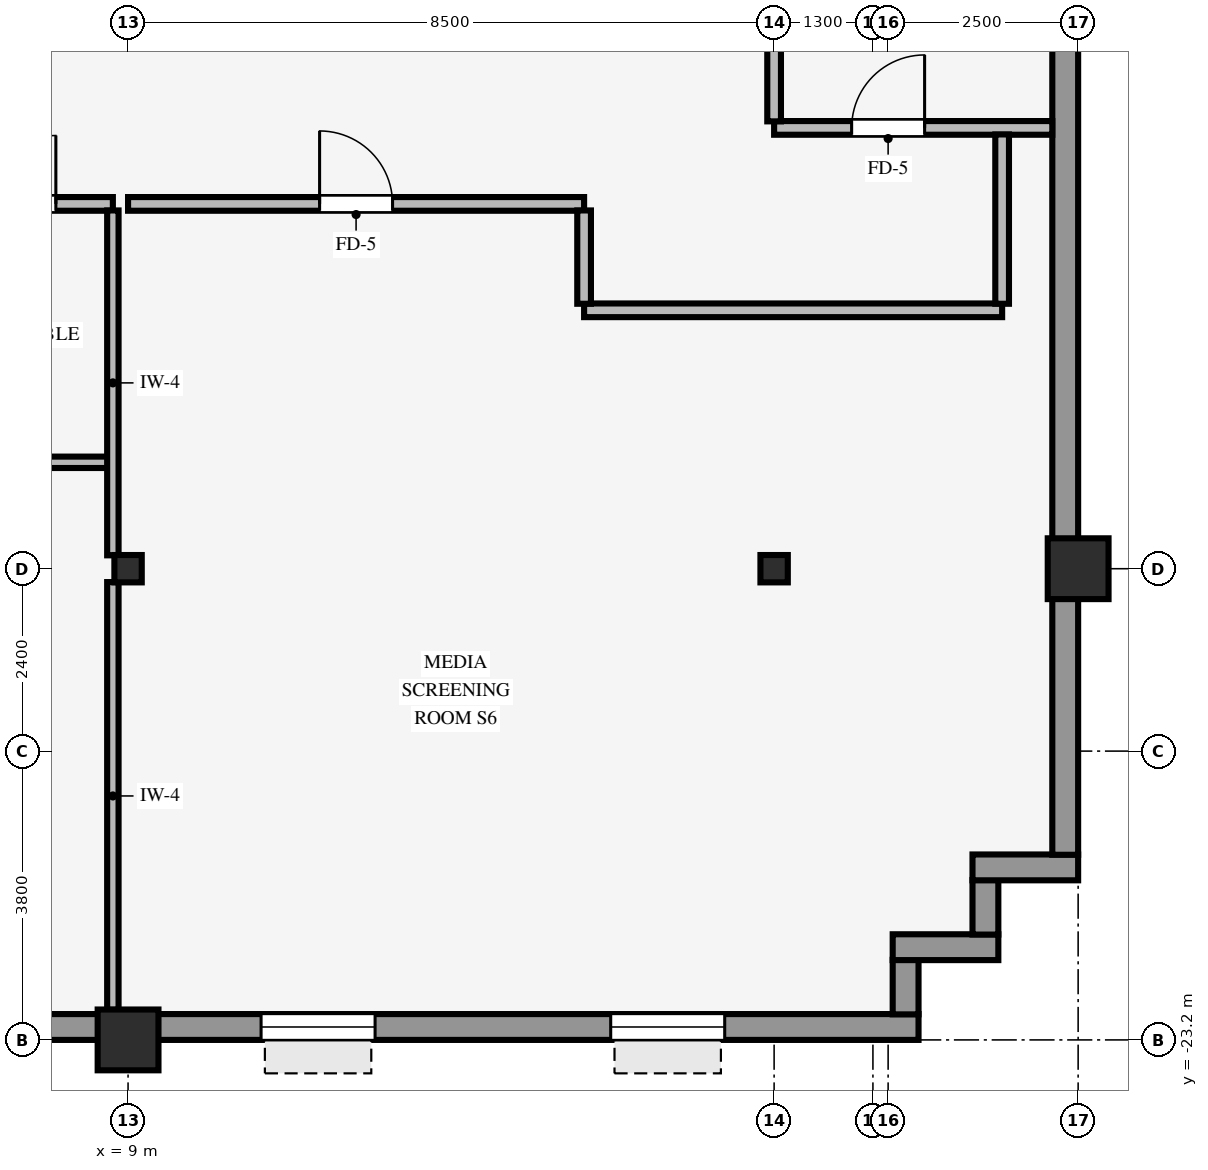
"""IFC4 building model, lengths in metres.
Left out: names, types, materials, properties, quantities, classifications, styles, units other than length and angle.
Written with IfcOpenShell. Run it as: python <this file> out.ifc"""

import sys

from ifc_helpers import new_model, si_unit, direction, frame, frame_2d, origin, origin_2d, place, context, subcontext, project, spatial, rectangle, hollow_rectangle, i_section, extrude, source, transform, mapped, element, fill, save


model = new_model("IFC4")
c1 = context("Model", 3, precision=1e-05, world=origin(), true_north=direction((0.0, 1.0)))
c2 = subcontext(c1, "Body", "Model", "MODEL_VIEW")
j1 = project(units=[si_unit("LENGTHUNIT", "METRE"), si_unit("PLANEANGLEUNIT", "RADIAN")], contexts=[c1])
p1 = place(None, origin())
s1 = spatial("IfcSite", under=j1, at=p1, CompositionType="ELEMENT")
p2 = place(p1, origin())
s2 = spatial("IfcBuilding", under=s1, at=p2, CompositionType="ELEMENT")
p3 = place(p2, frame((0.0, 0.0, 67.75)))
s3 = spatial("IfcBuildingStorey", under=s2, at=p3, CompositionType="ELEMENT", Elevation=67.75)
for number, where, z_axis, x_axis in (
    (1, (21.5, -17.0, 0.0), (0.0, 0.0, 1.0), (1.0, 0.0, 0.0)),
    (2, (9.0, -23.2, 0.0), (0.0, 0.0, 1.0), (1.0, 0.0, 0.0)),
):
    element("IfcColumn", number, at=place(p3, frame(where, z_axis=z_axis, x_axis=x_axis)), inside=s3, PredefinedType="COLUMN", context=c2, shape_type="SweptSolid", body=[
        extrude(hollow_rectangle(XDim=0.8, YDim=0.8, WallThickness=0.055, InnerFilletRadius=0.055, OuterFilletRadius=0.11, at=origin_2d()), origin(), (0.0, 0.0, 1.0), 3.37),
    ])
for number, where, z_axis, x_axis in (
    (3, (9.0, -17.0, 0.0), (0.0, 0.0, 1.0), (1.0, 0.0, 0.0)),
    (4, (17.5, -17.0, 0.0), (0.0, 0.0, 1.0), (1.0, 0.0, 0.0)),
):
    element("IfcColumn", number, at=place(p3, frame(where, z_axis=z_axis, x_axis=x_axis)), inside=s3, PredefinedType="COLUMN", context=c2, shape_type="SweptSolid", body=[
        extrude(i_section(OverallWidth=0.36, OverallDepth=0.36, WebThickness=0.021, FlangeThickness=0.021, FilletRadius=0.018, at=origin_2d()), origin(), (0.0, 0.0, 1.0), 3.37),
    ])
p4 = place(p3, frame((-19.4, -23.03, 0.0), z_axis=(0.0, 0.0, 1.0), x_axis=(1.0, 0.0, 0.0)))
e5 = element("IfcWall", 5, at=p4, inside=s3, PredefinedType="STANDARD", context=c2, shape_type="SweptSolid", body=[
    extrude(rectangle(XDim=38.8, YDim=0.34, at=frame_2d((19.4, 0.0))), origin(), (0.0, 0.0, 1.0), 2.705),
])
p5 = place(p4, frame((2.55, 0.0, 0.8)))
e6 = element("IfcOpeningElement", 6, at=p5, cuts=e5, PredefinedType="OPENING", context=c2, shape_type="SweptSolid", body=[
    extrude(rectangle(XDim=1.5, YDim=1.6, at=frame_2d((0.75, 0.8))), frame((0.0, 0.18, 0.0), z_axis=(0.0, -1.0, 0.0), x_axis=(1.0, 0.0, 0.0)), (0.0, 0.0, 1.0), 0.36),
])
p6 = place(p4, frame((6.25, 0.0, 0.8)))
e7 = element("IfcOpeningElement", 7, at=p6, cuts=e5, PredefinedType="OPENING", context=c2, shape_type="SweptSolid", body=[
    extrude(rectangle(XDim=1.5, YDim=1.6, at=frame_2d((0.75, 0.8))), frame((0.0, 0.18, 0.0), z_axis=(0.0, -1.0, 0.0), x_axis=(1.0, 0.0, 0.0)), (0.0, 0.0, 1.0), 0.36),
])
p7 = place(p4, frame((12.65, 0.0, 0.8)))
e8 = element("IfcOpeningElement", 8, at=p7, cuts=e5, PredefinedType="OPENING", context=c2, shape_type="SweptSolid", body=[
    extrude(rectangle(XDim=1.5, YDim=1.6, at=frame_2d((0.75, 0.8))), frame((0.0, 0.18, 0.0), z_axis=(0.0, -1.0, 0.0), x_axis=(1.0, 0.0, 0.0)), (0.0, 0.0, 1.0), 0.36),
])
p8 = place(p4, frame((16.35, 0.0, 0.8)))
e9 = element("IfcOpeningElement", 9, at=p8, cuts=e5, PredefinedType="OPENING", context=c2, shape_type="SweptSolid", body=[
    extrude(rectangle(XDim=1.5, YDim=1.6, at=frame_2d((0.75, 0.8))), frame((0.0, 0.18, 0.0), z_axis=(0.0, -1.0, 0.0), x_axis=(1.0, 0.0, 0.0)), (0.0, 0.0, 1.0), 0.36),
])
p9 = place(p4, frame((20.95, 0.0, 0.8)))
e10 = element("IfcOpeningElement", 10, at=p9, cuts=e5, PredefinedType="OPENING", context=c2, shape_type="SweptSolid", body=[
    extrude(rectangle(XDim=1.5, YDim=1.6, at=frame_2d((0.75, 0.8))), frame((0.0, 0.18, 0.0), z_axis=(0.0, -1.0, 0.0), x_axis=(1.0, 0.0, 0.0)), (0.0, 0.0, 1.0), 0.36),
])
p10 = place(p4, frame((25.55, 0.0, 0.8)))
e11 = element("IfcOpeningElement", 11, at=p10, cuts=e5, PredefinedType="OPENING", context=c2, shape_type="SweptSolid", body=[
    extrude(rectangle(XDim=1.5, YDim=1.6, at=frame_2d((0.75, 0.8))), frame((0.0, 0.18, 0.0), z_axis=(0.0, -1.0, 0.0), x_axis=(1.0, 0.0, 0.0)), (0.0, 0.0, 1.0), 0.36),
])
p11 = place(p4, frame((30.15, 0.0, 0.8)))
e12 = element("IfcOpeningElement", 12, at=p11, cuts=e5, PredefinedType="OPENING", context=c2, shape_type="SweptSolid", body=[
    extrude(rectangle(XDim=1.5, YDim=1.6, at=frame_2d((0.75, 0.8))), frame((0.0, 0.18, 0.0), z_axis=(0.0, -1.0, 0.0), x_axis=(1.0, 0.0, 0.0)), (0.0, 0.0, 1.0), 0.36),
])
p12 = place(p4, frame((34.75, 0.0, 0.8)))
e13 = element("IfcOpeningElement", 13, at=p12, cuts=e5, PredefinedType="OPENING", context=c2, shape_type="SweptSolid", body=[
    extrude(rectangle(XDim=1.5, YDim=1.6, at=frame_2d((0.75, 0.8))), frame((0.0, 0.18, 0.0), z_axis=(0.0, -1.0, 0.0), x_axis=(1.0, 0.0, 0.0)), (0.0, 0.0, 1.0), 0.36),
])
p13 = place(p3, frame((19.23, -22.864, 0.0), z_axis=(0.0, 0.0, 1.0), x_axis=(0.0, 1.0, 0.0)))
e14 = element("IfcWall", 14, at=p13, inside=s3, PredefinedType="STANDARD", context=c2, shape_type="SweptSolid", body=[
    extrude(rectangle(XDim=0.718, YDim=0.34, at=frame_2d((0.359, 0.0))), origin(), (0.0, 0.0, 1.0), 3.36),
])
p14 = place(p3, frame((19.06, -21.98, 0.0), z_axis=(0.0, 0.0, 1.0), x_axis=(1.0, 0.0, 0.0)))
e15 = element("IfcWall", 15, at=p14, inside=s3, PredefinedType="STANDARD", context=c2, shape_type="SweptSolid", body=[
    extrude(rectangle(XDim=1.39, YDim=0.34, at=frame_2d((0.695, 0.0))), origin(), (0.0, 0.0, 1.0), 3.36),
])
p15 = place(p3, frame((20.28, -21.814, 0.0), z_axis=(0.0, 0.0, 1.0), x_axis=(0.0, 1.0, 0.0)))
e16 = element("IfcWall", 16, at=p15, inside=s3, PredefinedType="STANDARD", context=c2, shape_type="SweptSolid", body=[
    extrude(rectangle(XDim=0.718, YDim=0.34, at=frame_2d((0.359, 0.0))), origin(), (0.0, 0.0, 1.0), 3.36),
])
p16 = place(p3, frame((20.11, -20.93, 0.0), z_axis=(0.0, 0.0, 1.0), x_axis=(1.0, 0.0, 0.0)))
e17 = element("IfcWall", 17, at=p16, inside=s3, PredefinedType="STANDARD", context=c2, shape_type="SweptSolid", body=[
    extrude(rectangle(XDim=1.39, YDim=0.34, at=frame_2d((0.695, 0.0))), origin(), (0.0, 0.0, 1.0), 3.36),
])
p17 = place(p3, frame((21.33, -20.764, 0.0), z_axis=(0.0, 0.0, 1.0), x_axis=(0.0, 1.0, 0.0)))
e18 = element("IfcWall", 18, at=p17, inside=s3, PredefinedType="STANDARD", context=c2, shape_type="SweptSolid", body=[
    extrude(rectangle(XDim=41.528, YDim=0.34, at=frame_2d((20.764, 0.0))), origin(), (0.0, 0.0, 1.0), 2.705),
])
p18 = place(p17, frame((12.202, 0.0, 0.8)))
e19 = element("IfcOpeningElement", 19, at=p18, cuts=e18, PredefinedType="OPENING", context=c2, shape_type="SweptSolid", body=[
    extrude(rectangle(XDim=2.3, YDim=1.62, at=frame_2d((1.15, 0.81))), frame((0.0, 0.18, 0.0), z_axis=(0.0, -1.0, 0.0), x_axis=(1.0, 0.0, 0.0)), (0.0, 0.0, 1.0), 0.36),
])
p19 = place(p17, frame((17.144, 0.0, 0.8)))
e20 = element("IfcOpeningElement", 20, at=p19, cuts=e18, PredefinedType="OPENING", context=c2, shape_type="SweptSolid", body=[
    extrude(rectangle(XDim=2.3, YDim=1.62, at=frame_2d((1.15, 0.81))), frame((0.0, 0.18, 0.0), z_axis=(0.0, -1.0, 0.0), x_axis=(1.0, 0.0, 0.0)), (0.0, 0.0, 1.0), 0.36),
])
p20 = place(p17, frame((22.084, 0.0, 0.8)))
e21 = element("IfcOpeningElement", 21, at=p20, cuts=e18, PredefinedType="OPENING", context=c2, shape_type="SweptSolid", body=[
    extrude(rectangle(XDim=2.3, YDim=1.62, at=frame_2d((1.15, 0.81))), frame((0.0, 0.18, 0.0), z_axis=(0.0, -1.0, 0.0), x_axis=(1.0, 0.0, 0.0)), (0.0, 0.0, 1.0), 0.36),
])
p21 = place(p17, frame((27.025, 0.0, 0.8)))
e22 = element("IfcOpeningElement", 22, at=p21, cuts=e18, PredefinedType="OPENING", context=c2, shape_type="SweptSolid", body=[
    extrude(rectangle(XDim=2.3, YDim=1.62, at=frame_2d((1.15, 0.81))), frame((0.0, 0.18, 0.0), z_axis=(0.0, -1.0, 0.0), x_axis=(1.0, 0.0, 0.0)), (0.0, 0.0, 1.0), 0.36),
])
p22 = place(p3, frame((1.2, -15.6, 0.0), z_axis=(0.0, 0.0, 1.0), x_axis=(1.0, 0.0, 0.0)))
e23 = element("IfcWall", 23, at=p22, inside=s3, PredefinedType="PARTITIONING", context=c2, shape_type="SweptSolid", body=[
    extrude(rectangle(XDim=7.539, YDim=0.15, at=frame_2d((3.77, 0.0))), origin(), (0.0, 0.0, 1.0), 3.36),
])
p23 = place(p3, frame((15.0, -13.6, 0.0), z_axis=(0.0, 0.0, 1.0), x_axis=(1.0, 0.0, 0.0)))
e24 = element("IfcWall", 24, at=p23, inside=s3, PredefinedType="PARTITIONING", context=c2, shape_type="SweptSolid", body=[
    extrude(rectangle(XDim=5.5, YDim=0.18, at=frame_2d((2.75, 0.0))), origin(), (0.0, 0.0, 1.0), 2.942),
])
p24 = place(p3, frame((-15.0, -12.2, 0.0), z_axis=(0.0, 0.0, 1.0), x_axis=(1.0, 0.0, 0.0)))
e25 = element("IfcWall", 25, at=p24, inside=s3, PredefinedType="PARTITIONING", context=c2, shape_type="SweptSolid", body=[
    extrude(rectangle(XDim=23.8, YDim=0.18, at=frame_2d((11.9, 0.0))), origin(), (0.0, 0.0, 1.0), 3.36),
])
p25 = place(p24, frame((9.31, 0.0, 0.0)))
e26 = element("IfcOpeningElement", 26, at=p25, cuts=e25, PredefinedType="OPENING", context=c2, shape_type="SweptSolid", body=[
    extrude(rectangle(XDim=0.96, YDim=2.1, at=frame_2d((0.48, 1.05))), frame((0.0, 0.1, 0.0), z_axis=(0.0, -1.0, 0.0), x_axis=(1.0, 0.0, 0.0)), (0.0, 0.0, 1.0), 0.2),
])
p26 = place(p24, frame((1.715, 0.0, 0.0)))
e27 = element("IfcOpeningElement", 27, at=p26, cuts=e25, PredefinedType="OPENING", context=c2, shape_type="SweptSolid", body=[
    extrude(rectangle(XDim=0.96, YDim=2.1, at=frame_2d((0.48, 1.05))), frame((0.0, 0.1, 0.0), z_axis=(0.0, -1.0, 0.0), x_axis=(1.0, 0.0, 0.0)), (0.0, 0.0, 1.0), 0.2),
])
p27 = place(p24, frame((5.44, 0.0, 0.0)))
e28 = element("IfcOpeningElement", 28, at=p27, cuts=e25, PredefinedType="OPENING", context=c2, shape_type="SweptSolid", body=[
    extrude(rectangle(XDim=0.96, YDim=2.1, at=frame_2d((0.48, 1.05))), frame((0.0, 0.1, 0.0), z_axis=(0.0, -1.0, 0.0), x_axis=(1.0, 0.0, 0.0)), (0.0, 0.0, 1.0), 0.2),
])
p28 = place(p24, frame((19.65, 0.0, 0.0)))
e29 = element("IfcOpeningElement", 29, at=p28, cuts=e25, PredefinedType="OPENING", context=c2, shape_type="SweptSolid", body=[
    extrude(rectangle(XDim=0.9, YDim=2.1, at=frame_2d((0.45, 1.05))), frame((0.0, 0.1, 0.0), z_axis=(0.0, -1.0, 0.0), x_axis=(1.0, 0.0, 0.0)), (0.0, 0.0, 1.0), 0.2),
])
p29 = place(p24, frame((17.05, 0.0, 0.0)))
e30 = element("IfcOpeningElement", 30, at=p29, cuts=e25, PredefinedType="OPENING", context=c2, shape_type="SweptSolid", body=[
    extrude(rectangle(XDim=0.9, YDim=2.1, at=frame_2d((0.45, 1.05))), frame((0.0, 0.1, 0.0), z_axis=(0.0, -1.0, 0.0), x_axis=(1.0, 0.0, 0.0)), (0.0, 0.0, 1.0), 0.2),
])
p30 = place(p24, frame((22.15, 0.0, 0.0)))
e31 = element("IfcOpeningElement", 31, at=p30, cuts=e25, PredefinedType="OPENING", context=c2, shape_type="SweptSolid", body=[
    extrude(rectangle(XDim=0.9, YDim=2.1, at=frame_2d((0.45, 1.05))), frame((0.0, 0.1, 0.0), z_axis=(0.0, -1.0, 0.0), x_axis=(1.0, 0.0, 0.0)), (0.0, 0.0, 1.0), 0.2),
])
p31 = place(p24, frame((14.72, 0.0, 0.0)))
e32 = element("IfcOpeningElement", 32, at=p31, cuts=e25, PredefinedType="OPENING", context=c2, shape_type="SweptSolid", body=[
    extrude(rectangle(XDim=0.96, YDim=2.1, at=frame_2d((0.48, 1.05))), frame((0.0, 0.1, 0.0), z_axis=(0.0, -1.0, 0.0), x_axis=(1.0, 0.0, 0.0)), (0.0, 0.0, 1.0), 0.2),
])
p32 = place(p3, frame((9.0, -12.2, 0.0), z_axis=(0.0, 0.0, 1.0), x_axis=(1.0, 0.0, 0.0)))
e33 = element("IfcWall", 33, at=p32, inside=s3, PredefinedType="PARTITIONING", context=c2, shape_type="SweptSolid", body=[
    extrude(rectangle(XDim=6.0, YDim=0.18, at=frame_2d((3.0, 0.0))), origin(), (0.0, 0.0, 1.0), 3.36),
])
p33 = place(p32, frame((2.52, 0.0, 0.0)))
e34 = element("IfcOpeningElement", 34, at=p33, cuts=e33, PredefinedType="OPENING", context=c2, shape_type="SweptSolid", body=[
    extrude(rectangle(XDim=0.96, YDim=2.1, at=frame_2d((0.48, 1.05))), frame((0.0, 0.1, 0.0), z_axis=(0.0, -1.0, 0.0), x_axis=(1.0, 0.0, 0.0)), (0.0, 0.0, 1.0), 0.2),
])
p34 = place(p3, frame((17.5, -11.2, 0.0), z_axis=(0.0, 0.0, 1.0), x_axis=(1.0, 0.0, 0.0)))
e35 = element("IfcWall", 35, at=p34, inside=s3, PredefinedType="PARTITIONING", context=c2, shape_type="SweptSolid", body=[
    extrude(rectangle(XDim=3.66, YDim=0.18, at=frame_2d((1.83, 0.0))), origin(), (0.0, 0.0, 1.0), 3.36),
])
p35 = place(p34, frame((1.02, 0.0, 0.0)))
e36 = element("IfcOpeningElement", 36, at=p35, cuts=e35, PredefinedType="OPENING", context=c2, shape_type="SweptSolid", body=[
    extrude(rectangle(XDim=0.96, YDim=2.1, at=frame_2d((0.48, 1.05))), frame((0.0, 0.1, 0.0), z_axis=(0.0, -1.0, 0.0), x_axis=(1.0, 0.0, 0.0)), (0.0, 0.0, 1.0), 0.2),
])
p36 = place(p3, frame((8.8, -22.804, 0.0), z_axis=(0.0, 0.0, 1.0), x_axis=(0.0, 1.0, 0.0)))
e37 = element("IfcWall", 37, at=p36, inside=s3, PredefinedType="PARTITIONING", context=c2, shape_type="SweptSolid", body=[
    extrude(rectangle(XDim=5.628, YDim=0.15, at=frame_2d((2.814, 0.0))), origin(), (0.0, 0.0, 1.0), 2.738),
])
p37 = place(p3, frame((8.8, -16.824, 0.0), z_axis=(0.0, 0.0, 1.0), x_axis=(0.0, 1.0, 0.0)))
e38 = element("IfcWall", 38, at=p37, inside=s3, PredefinedType="PARTITIONING", context=c2, shape_type="SweptSolid", body=[
    extrude(rectangle(XDim=4.538, YDim=0.15, at=frame_2d((2.269, 0.0))), origin(), (0.0, 0.0, 1.0), 2.738),
])
p38 = place(p3, frame((15.0, -13.514, 0.0), z_axis=(0.0, 0.0, 1.0), x_axis=(0.0, 1.0, 0.0)))
e39 = element("IfcWall", 39, at=p38, inside=s3, PredefinedType="PARTITIONING", context=c2, shape_type="SweptSolid", body=[
    extrude(rectangle(XDim=1.228, YDim=0.18, at=frame_2d((0.614, 0.0))), origin(), (0.0, 0.0, 1.0), 3.36),
])
p39 = place(p3, frame((17.5, -11.114, 0.0), z_axis=(0.0, 0.0, 1.0), x_axis=(0.0, 1.0, 0.0)))
e40 = element("IfcWall", 40, at=p39, inside=s3, PredefinedType="PARTITIONING", context=c2, shape_type="SweptSolid", body=[
    extrude(rectangle(XDim=0.968, YDim=0.18, at=frame_2d((0.484, 0.0))), origin(), (0.0, 0.0, 1.0), 2.738),
])
p40 = place(p3, frame((20.5, -13.514, 0.0), z_axis=(0.0, 0.0, 1.0), x_axis=(0.0, 1.0, 0.0)))
e41 = element("IfcWall", 41, at=p40, inside=s3, PredefinedType="PARTITIONING", context=c2, shape_type="SweptSolid", body=[
    extrude(rectangle(XDim=2.228, YDim=0.18, at=frame_2d((1.114, 0.0))), origin(), (0.0, 0.0, 1.0), 3.36),
])
m1 = source(origin(), c2, "Body", "SweptSolid", [
    extrude(rectangle(XDim=1.5, YDim=1.6, at=frame_2d((0.75, 0.8))), frame((0.0, 0.03, 0.0), z_axis=(0.0, -1.0, 0.0), x_axis=(1.0, 0.0, 0.0)), (0.0, 0.0, 1.0), 0.06),
])
p41 = place(p11, origin())
e42 = element("IfcWindow", 42, at=p41, inside=s3, PartitioningType="SINGLE_PANEL", PredefinedType="WINDOW", context=c2, shape_type="MappedRepresentation", body=[
    mapped(m1, transform((0.0, 0.0, 0.0), scale=1.0)),
])
fill(e12, e42)
p42 = place(p12, origin())
e43 = element("IfcWindow", 43, at=p42, inside=s3, PartitioningType="SINGLE_PANEL", PredefinedType="WINDOW", context=c2, shape_type="MappedRepresentation", body=[
    mapped(m1, transform((0.0, 0.0, 0.0), scale=1.0)),
])
fill(e13, e43)
m2 = source(origin(), c2, "Body", "SweptSolid", [
    extrude(rectangle(XDim=0.96, YDim=2.1, at=frame_2d((0.48, 1.05))), frame((0.0, 0.025, 0.0), z_axis=(0.0, -1.0, 0.0), x_axis=(1.0, 0.0, 0.0)), (0.0, 0.0, 1.0), 0.05),
])
p43 = place(p33, origin())
e44 = element("IfcDoor", 44, at=p43, inside=s3, OperationType="SINGLE_SWING_LEFT", PredefinedType="DOOR", context=c2, shape_type="MappedRepresentation", body=[
    mapped(m2, transform((0.0, 0.0, 0.0), scale=1.0)),
])
fill(e34, e44)
p44 = place(p35, origin())
e45 = element("IfcDoor", 45, at=p44, inside=s3, OperationType="SINGLE_SWING_RIGHT", PredefinedType="DOOR", context=c2, shape_type="MappedRepresentation", body=[
    mapped(m2, transform((0.0, 0.0, 0.0), scale=1.0)),
])
fill(e36, e45)
m3 = source(origin(), c2, "Body", "SweptSolid", [
    extrude(rectangle(XDim=0.9, YDim=2.1, at=frame_2d((0.45, 1.05))), frame((0.0, 0.025, 0.0), z_axis=(0.0, -1.0, 0.0), x_axis=(1.0, 0.0, 0.0)), (0.0, 0.0, 1.0), 0.05),
])
p45 = place(p30, origin())
e46 = element("IfcDoor", 46, at=p45, inside=s3, OperationType="SINGLE_SWING_RIGHT", PredefinedType="DOOR", context=c2, shape_type="MappedRepresentation", body=[
    mapped(m3, transform((0.0, 0.0, 0.0), scale=1.0)),
])
fill(e31, e46)
save(model, sys.argv[1])
